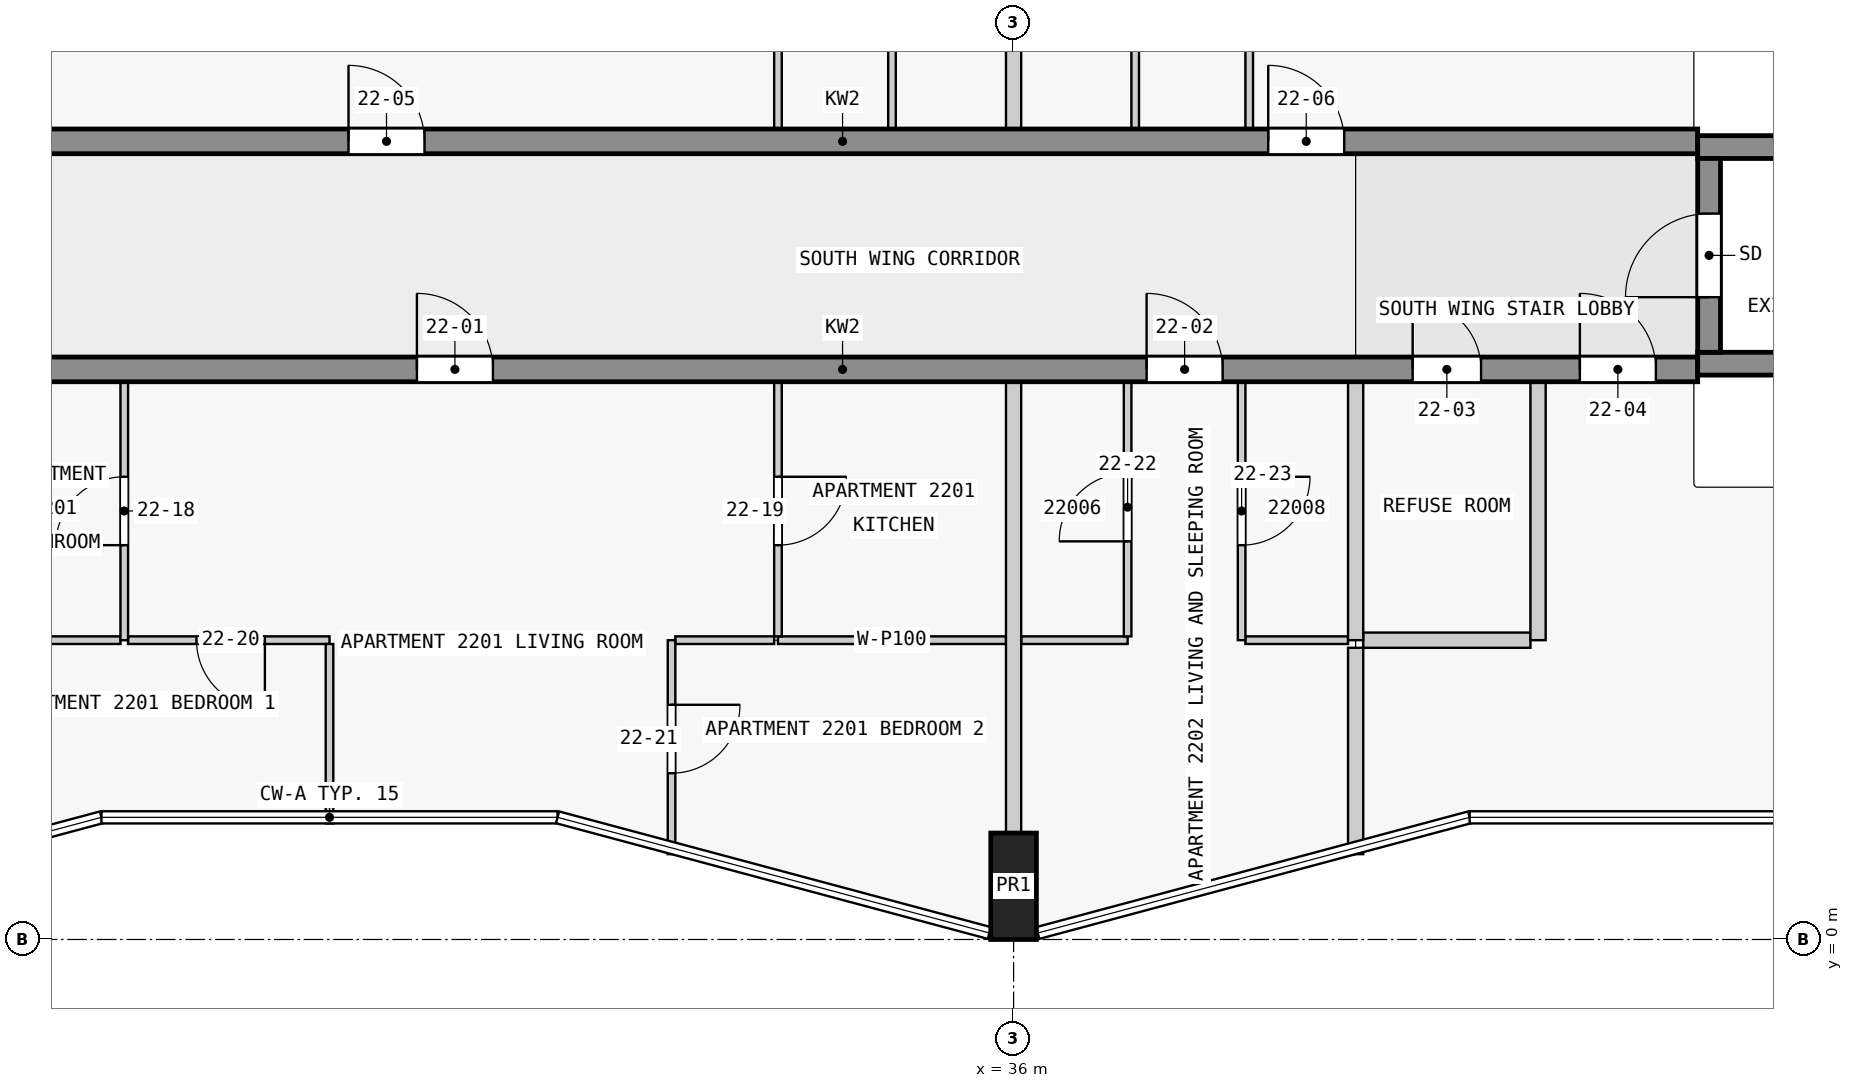
"""IFC4 building model, lengths in metres.
Left out: names, types, materials, properties, quantities, classifications, styles, units other than length and angle.
Written with IfcOpenShell. Run it as: python <this file> out.ifc"""

import sys

from ifc_helpers import new_model, si_unit, direction, frame, frame_2d, origin, origin_2d, place, context, subcontext, project, spatial, rectangle, extrude, element, fill, save


model = new_model("IFC4")
c1 = context("Model", 3, precision=1e-05, world=origin(), true_north=direction((0.0, 1.0)))
c2 = subcontext(c1, "Body", "Model", "MODEL_VIEW")
j1 = project(units=[si_unit("LENGTHUNIT", "METRE"), si_unit("PLANEANGLEUNIT", "RADIAN")], contexts=[c1])
p1 = place(None, origin())
s1 = spatial("IfcSite", under=j1, at=p1, CompositionType="ELEMENT")
p2 = place(p1, origin())
s2 = spatial("IfcBuilding", under=s1, at=p2, CompositionType="ELEMENT")
p3 = place(p2, frame((0.0, 0.0, 88.8)))
s3 = spatial("IfcBuildingStorey", under=s2, at=p3, CompositionType="ELEMENT", Elevation=88.8)
p4 = place(p3, frame((36.0, 0.7, 0.0), z_axis=(0.0, 0.0, 1.0), x_axis=(1.0, 0.0, 0.0)))
e1 = element("IfcColumn", 1, at=p4, inside=s3, PredefinedType="COLUMN", context=c2, shape_type="SweptSolid", body=[
    extrude(rectangle(XDim=0.6, YDim=1.4, at=origin_2d()), origin(), (0.0, 0.0, 1.0), 3.5),
])
p5 = place(p3, frame((45.15, 7.725, 0.0), z_axis=(0.0, 0.0, 1.0), x_axis=(0.0, 1.0, 0.0)))
e2 = element("IfcWall", 2, at=p5, inside=s3, PredefinedType="SHEAR", context=c2, shape_type="SweptSolid", body=[
    extrude(rectangle(XDim=2.55, YDim=0.3, at=frame_2d((1.275, 0.0))), origin(), (0.0, 0.0, 1.0), 3.5),
])
p6 = place(p5, frame((0.725, 0.0, 0.0)))
e3 = element("IfcOpeningElement", 3, at=p6, cuts=e2, PredefinedType="OPENING", context=c2, shape_type="SweptSolid", body=[
    extrude(rectangle(XDim=1.1, YDim=2.1, at=frame_2d((0.55, 1.05))), frame((0.0, 0.16, 0.0), z_axis=(0.0, -1.0, 0.0), x_axis=(1.0, 0.0, 0.0)), (0.0, 0.0, 1.0), 0.32),
])
for number, where, z_axis, x_axis in (
    (4, (45.0, 7.575, 0.0), (0.0, 0.0, 1.0), (1.0, 0.0, 0.0)),
    (5, (45.0, 10.425, 0.0), (0.0, 0.0, 1.0), (1.0, 0.0, 0.0)),
):
    element("IfcWall", number, at=place(p3, frame(where, z_axis=z_axis, x_axis=x_axis)), inside=s3, PredefinedType="SHEAR", context=c2, shape_type="SweptSolid", body=[
        extrude(rectangle(XDim=7.2, YDim=0.3, at=frame_2d((3.6, 0.0))), origin(), (0.0, 0.0, 1.0), 3.5),
    ])
p7 = place(p3, frame((22.5, 7.5, 0.0), z_axis=(0.0, 0.0, 1.0), x_axis=(1.0, 0.0, 0.0)))
e6 = element("IfcWall", 6, at=p7, inside=s3, PredefinedType="SHEAR", context=c2, shape_type="SweptSolid", body=[
    extrude(rectangle(XDim=22.5, YDim=0.325, at=frame_2d((11.25, 0.0))), origin(), (0.0, 0.0, 1.0), 3.25),
])
p8 = place(p7, frame((5.65, 0.0, 0.0)))
e7 = element("IfcOpeningElement", 7, at=p8, cuts=e6, PredefinedType="OPENING", context=c2, shape_type="SweptSolid", body=[
    extrude(rectangle(XDim=1.0, YDim=2.1, at=frame_2d((0.5, 1.05))), frame((0.0, 0.172, 0.0), z_axis=(0.0, -1.0, 0.0), x_axis=(1.0, 0.0, 0.0)), (0.0, 0.0, 1.0), 0.345),
])
p9 = place(p7, frame((15.25, 0.0, 0.0)))
e8 = element("IfcOpeningElement", 8, at=p9, cuts=e6, PredefinedType="OPENING", context=c2, shape_type="SweptSolid", body=[
    extrude(rectangle(XDim=1.0, YDim=2.1, at=frame_2d((0.5, 1.05))), frame((0.0, 0.172, 0.0), z_axis=(0.0, -1.0, 0.0), x_axis=(1.0, 0.0, 0.0)), (0.0, 0.0, 1.0), 0.345),
])
p10 = place(p7, frame((18.75, 0.0, 0.0)))
e9 = element("IfcOpeningElement", 9, at=p10, cuts=e6, PredefinedType="OPENING", context=c2, shape_type="SweptSolid", body=[
    extrude(rectangle(XDim=0.9, YDim=2.1, at=frame_2d((0.45, 1.05))), frame((0.0, 0.172, 0.0), z_axis=(0.0, -1.0, 0.0), x_axis=(1.0, 0.0, 0.0)), (0.0, 0.0, 1.0), 0.345),
])
p11 = place(p7, frame((20.95, 0.0, 0.0)))
e10 = element("IfcOpeningElement", 10, at=p11, cuts=e6, PredefinedType="OPENING", context=c2, shape_type="SweptSolid", body=[
    extrude(rectangle(XDim=1.0, YDim=2.1, at=frame_2d((0.5, 1.05))), frame((0.0, 0.172, 0.0), z_axis=(0.0, -1.0, 0.0), x_axis=(1.0, 0.0, 0.0)), (0.0, 0.0, 1.0), 0.345),
])
p12 = place(p3, frame((22.5, 10.5, 0.0), z_axis=(0.0, 0.0, 1.0), x_axis=(1.0, 0.0, 0.0)))
e11 = element("IfcWall", 11, at=p12, inside=s3, PredefinedType="SHEAR", context=c2, shape_type="SweptSolid", body=[
    extrude(rectangle(XDim=22.5, YDim=0.325, at=frame_2d((11.25, 0.0))), origin(), (0.0, 0.0, 1.0), 3.25),
])
p13 = place(p12, frame((4.75, 0.0, 0.0)))
e12 = element("IfcOpeningElement", 12, at=p13, cuts=e11, PredefinedType="OPENING", context=c2, shape_type="SweptSolid", body=[
    extrude(rectangle(XDim=1.0, YDim=2.1, at=frame_2d((0.5, 1.05))), frame((0.0, 0.172, 0.0), z_axis=(0.0, -1.0, 0.0), x_axis=(1.0, 0.0, 0.0)), (0.0, 0.0, 1.0), 0.345),
])
p14 = place(p12, frame((16.85, 0.0, 0.0)))
e13 = element("IfcOpeningElement", 13, at=p14, cuts=e11, PredefinedType="OPENING", context=c2, shape_type="SweptSolid", body=[
    extrude(rectangle(XDim=1.0, YDim=2.1, at=frame_2d((0.5, 1.05))), frame((0.0, 0.172, 0.0), z_axis=(0.0, -1.0, 0.0), x_axis=(1.0, 0.0, 0.0)), (0.0, 0.0, 1.0), 0.345),
])
p15 = place(p3, frame((27.0, 3.938, 0.0), z_axis=(0.0, 0.0, 1.0), x_axis=(-1.0, 0.0, 0.0)))
e14 = element("IfcWall", 14, at=p15, inside=s3, PredefinedType="PARTITIONING", context=c2, shape_type="SweptSolid", body=[
    extrude(rectangle(XDim=2.65, YDim=0.1, at=frame_2d((1.325, 0.0))), origin(), (0.0, 0.0, 1.0), 3.25),
])
p16 = place(p15, frame((0.85, 0.0, 0.0)))
e15 = element("IfcOpeningElement", 15, at=p16, cuts=e14, PredefinedType="OPENING", context=c2, shape_type="SweptSolid", body=[
    extrude(rectangle(XDim=0.9, YDim=2.1, at=frame_2d((0.45, 1.05))), frame((0.0, 0.06, 0.0), z_axis=(0.0, -1.0, 0.0), x_axis=(1.0, 0.0, 0.0)), (0.0, 0.0, 1.0), 0.12),
])
p17 = place(p3, frame((32.85, 3.938, 0.0), z_axis=(0.0, 0.0, 1.0), x_axis=(-1.0, 0.0, 0.0)))
e16 = element("IfcWall", 16, at=p17, inside=s3, PredefinedType="PARTITIONING", context=c2, shape_type="SweptSolid", body=[
    extrude(rectangle(XDim=1.3, YDim=0.1, at=frame_2d((0.65, 0.0))), origin(), (0.0, 0.0, 1.0), 3.25),
])
p18 = place(p3, frame((22.5, 3.938, 0.0), z_axis=(0.0, 0.0, 1.0), x_axis=(1.0, 0.0, 0.0)))
e17 = element("IfcWall", 17, at=p18, inside=s3, PredefinedType="PARTITIONING", context=c2, shape_type="SweptSolid", body=[
    extrude(rectangle(XDim=1.75, YDim=0.1, at=frame_2d((0.875, 0.0))), origin(), (0.0, 0.0, 1.0), 3.25),
])
p19 = place(p3, frame((32.9, 3.938, 0.0), z_axis=(0.0, 0.0, 1.0), x_axis=(1.0, 0.0, 0.0)))
e18 = element("IfcWall", 18, at=p19, inside=s3, PredefinedType="PARTITIONING", context=c2, shape_type="SweptSolid", body=[
    extrude(rectangle(XDim=3.0, YDim=0.1, at=frame_2d((1.5, 0.0))), origin(), (0.0, 0.0, 1.0), 3.25),
])
p20 = place(p3, frame((36.1, 3.938, 0.0), z_axis=(0.0, 0.0, 1.0), x_axis=(1.0, 0.0, 0.0)))
e19 = element("IfcWall", 19, at=p20, inside=s3, PredefinedType="PARTITIONING", context=c2, shape_type="SweptSolid", body=[
    extrude(rectangle(XDim=1.4, YDim=0.1, at=frame_2d((0.7, 0.0))), origin(), (0.0, 0.0, 1.0), 3.25),
])
p21 = place(p3, frame((39.05, 3.938, 0.0), z_axis=(0.0, 0.0, 1.0), x_axis=(1.0, 0.0, 0.0)))
e20 = element("IfcWall", 20, at=p21, inside=s3, PredefinedType="PARTITIONING", context=c2, shape_type="SweptSolid", body=[
    extrude(rectangle(XDim=1.35, YDim=0.1, at=frame_2d((0.675, 0.0))), origin(), (0.0, 0.0, 1.0), 3.25),
])
p22 = place(p3, frame((40.6, 3.938, 0.0), z_axis=(0.0, 0.0, 1.0), x_axis=(1.0, 0.0, 0.0)))
e21 = element("IfcWall", 21, at=p22, inside=s3, PredefinedType="PARTITIONING", context=c2, shape_type="SweptSolid", body=[
    extrude(rectangle(XDim=2.2, YDim=0.2, at=frame_2d((1.1, 0.0))), origin(), (0.0, 0.0, 1.0), 3.25),
])
p23 = place(p3, frame((24.3, 3.938, 0.0), z_axis=(0.0, 0.0, 1.0), x_axis=(0.0, 1.0, 0.0)))
e22 = element("IfcWall", 22, at=p23, inside=s3, PredefinedType="PARTITIONING", context=c2, shape_type="SweptSolid", body=[
    extrude(rectangle(XDim=3.4, YDim=0.1, at=frame_2d((1.7, 0.0))), origin(), (0.0, 0.0, 1.0), 3.25),
])
p24 = place(p23, frame((1.25, 0.0, 0.0)))
e23 = element("IfcOpeningElement", 23, at=p24, cuts=e22, PredefinedType="OPENING", context=c2, shape_type="SweptSolid", body=[
    extrude(rectangle(XDim=0.9, YDim=2.1, at=frame_2d((0.45, 1.05))), frame((0.0, 0.06, 0.0), z_axis=(0.0, -1.0, 0.0), x_axis=(1.0, 0.0, 0.0)), (0.0, 0.0, 1.0), 0.12),
])
p25 = place(p3, frame((27.0, 1.527, 0.0), z_axis=(0.0, 0.0, 1.0), x_axis=(0.0, 1.0, 0.0)))
e24 = element("IfcWall", 24, at=p25, inside=s3, PredefinedType="PARTITIONING", context=c2, shape_type="SweptSolid", body=[
    extrude(rectangle(XDim=2.361, YDim=0.1, at=frame_2d((1.18, 0.0))), origin(), (0.0, 0.0, 1.0), 3.25),
])
p26 = place(p3, frame((31.5, 3.938, 0.0), z_axis=(0.0, 0.0, 1.0), x_axis=(0.0, -1.0, 0.0)))
e25 = element("IfcWall", 25, at=p26, inside=s3, PredefinedType="PARTITIONING", context=c2, shape_type="SweptSolid", body=[
    extrude(rectangle(XDim=2.815, YDim=0.1, at=frame_2d((1.408, 0.0))), origin(), (0.0, 0.0, 1.0), 3.25),
])
p27 = place(p26, frame((0.85, 0.0, 0.0)))
e26 = element("IfcOpeningElement", 26, at=p27, cuts=e25, PredefinedType="OPENING", context=c2, shape_type="SweptSolid", body=[
    extrude(rectangle(XDim=0.9, YDim=2.1, at=frame_2d((0.45, 1.05))), frame((0.0, 0.06, 0.0), z_axis=(0.0, -1.0, 0.0), x_axis=(1.0, 0.0, 0.0)), (0.0, 0.0, 1.0), 0.12),
])
p28 = place(p3, frame((32.9, 7.337, 0.0), z_axis=(0.0, 0.0, 1.0), x_axis=(0.0, -1.0, 0.0)))
e27 = element("IfcWall", 27, at=p28, inside=s3, PredefinedType="PARTITIONING", context=c2, shape_type="SweptSolid", body=[
    extrude(rectangle(XDim=3.35, YDim=0.1, at=frame_2d((1.675, 0.0))), origin(), (0.0, 0.0, 1.0), 3.25),
])
p29 = place(p28, frame((1.25, 0.0, 0.0)))
e28 = element("IfcOpeningElement", 28, at=p29, cuts=e27, PredefinedType="OPENING", context=c2, shape_type="SweptSolid", body=[
    extrude(rectangle(XDim=0.9, YDim=2.1, at=frame_2d((0.45, 1.05))), frame((0.0, 0.06, 0.0), z_axis=(0.0, -1.0, 0.0), x_axis=(1.0, 0.0, 0.0)), (0.0, 0.0, 1.0), 0.12),
])
p30 = place(p3, frame((32.9, 14.012, 0.0), z_axis=(0.0, 0.0, 1.0), x_axis=(0.0, -1.0, 0.0)))
e29 = element("IfcWall", 29, at=p30, inside=s3, PredefinedType="PARTITIONING", context=c2, shape_type="SweptSolid", body=[
    extrude(rectangle(XDim=3.35, YDim=0.1, at=frame_2d((1.675, 0.0))), origin(), (0.0, 0.0, 1.0), 3.25),
])
p31 = place(p30, frame((1.25, 0.0, 0.0)))
e30 = element("IfcOpeningElement", 30, at=p31, cuts=e29, PredefinedType="OPENING", context=c2, shape_type="SweptSolid", body=[
    extrude(rectangle(XDim=0.9, YDim=2.1, at=frame_2d((0.45, 1.05))), frame((0.0, 0.06, 0.0), z_axis=(0.0, -1.0, 0.0), x_axis=(1.0, 0.0, 0.0)), (0.0, 0.0, 1.0), 0.12),
])
p32 = place(p3, frame((34.4, 10.663, 0.0), z_axis=(0.0, 0.0, 1.0), x_axis=(0.0, 1.0, 0.0)))
e31 = element("IfcWall", 31, at=p32, inside=s3, PredefinedType="PARTITIONING", context=c2, shape_type="SweptSolid", body=[
    extrude(rectangle(XDim=3.35, YDim=0.1, at=frame_2d((1.675, 0.0))), origin(), (0.0, 0.0, 1.0), 3.25),
])
p33 = place(p3, frame((36.0, 1.4, 0.0), z_axis=(0.0, 0.0, 1.0), x_axis=(0.0, 1.0, 0.0)))
e32 = element("IfcWall", 32, at=p33, inside=s3, PredefinedType="PARTITIONING", context=c2, shape_type="SweptSolid", body=[
    extrude(rectangle(XDim=5.938, YDim=0.2, at=frame_2d((2.969, 0.0))), origin(), (0.0, 0.0, 1.0), 3.25),
])
p34 = place(p3, frame((36.0, 10.663, 0.0), z_axis=(0.0, 0.0, 1.0), x_axis=(0.0, 1.0, 0.0)))
e33 = element("IfcWall", 33, at=p34, inside=s3, PredefinedType="PARTITIONING", context=c2, shape_type="SweptSolid", body=[
    extrude(rectangle(XDim=3.4, YDim=0.2, at=frame_2d((1.7, 0.0))), origin(), (0.0, 0.0, 1.0), 3.25),
])
p35 = place(p3, frame((37.5, 3.988, 0.0), z_axis=(0.0, 0.0, 1.0), x_axis=(0.0, 1.0, 0.0)))
e34 = element("IfcWall", 34, at=p35, inside=s3, PredefinedType="PARTITIONING", context=c2, shape_type="SweptSolid", body=[
    extrude(rectangle(XDim=3.35, YDim=0.1, at=frame_2d((1.675, 0.0))), origin(), (0.0, 0.0, 1.0), 3.25),
])
p36 = place(p35, frame((1.25, 0.0, 0.0)))
e35 = element("IfcOpeningElement", 35, at=p36, cuts=e34, PredefinedType="OPENING", context=c2, shape_type="SweptSolid", body=[
    extrude(rectangle(XDim=0.9, YDim=2.1, at=frame_2d((0.45, 1.05))), frame((0.0, 0.06, 0.0), z_axis=(0.0, -1.0, 0.0), x_axis=(1.0, 0.0, 0.0)), (0.0, 0.0, 1.0), 0.12),
])
p37 = place(p3, frame((37.6, 10.663, 0.0), z_axis=(0.0, 0.0, 1.0), x_axis=(0.0, 1.0, 0.0)))
e36 = element("IfcWall", 36, at=p37, inside=s3, PredefinedType="PARTITIONING", context=c2, shape_type="SweptSolid", body=[
    extrude(rectangle(XDim=3.35, YDim=0.1, at=frame_2d((1.675, 0.0))), origin(), (0.0, 0.0, 1.0), 3.25),
])
p38 = place(p3, frame((39.0, 7.337, 0.0), z_axis=(0.0, 0.0, 1.0), x_axis=(0.0, -1.0, 0.0)))
e37 = element("IfcWall", 37, at=p38, inside=s3, PredefinedType="PARTITIONING", context=c2, shape_type="SweptSolid", body=[
    extrude(rectangle(XDim=3.4, YDim=0.1, at=frame_2d((1.7, 0.0))), origin(), (0.0, 0.0, 1.0), 3.25),
])
p39 = place(p38, frame((1.25, 0.0, 0.0)))
e38 = element("IfcOpeningElement", 38, at=p39, cuts=e37, PredefinedType="OPENING", context=c2, shape_type="SweptSolid", body=[
    extrude(rectangle(XDim=0.9, YDim=2.1, at=frame_2d((0.45, 1.05))), frame((0.0, 0.06, 0.0), z_axis=(0.0, -1.0, 0.0), x_axis=(1.0, 0.0, 0.0)), (0.0, 0.0, 1.0), 0.12),
])
p40 = place(p3, frame((39.1, 10.663, 0.0), z_axis=(0.0, 0.0, 1.0), x_axis=(0.0, 1.0, 0.0)))
e39 = element("IfcWall", 39, at=p40, inside=s3, PredefinedType="PARTITIONING", context=c2, shape_type="SweptSolid", body=[
    extrude(rectangle(XDim=3.35, YDim=0.1, at=frame_2d((1.675, 0.0))), origin(), (0.0, 0.0, 1.0), 3.25),
])
p41 = place(p40, frame((1.25, 0.0, 0.0)))
e40 = element("IfcOpeningElement", 40, at=p41, cuts=e39, PredefinedType="OPENING", context=c2, shape_type="SweptSolid", body=[
    extrude(rectangle(XDim=0.9, YDim=2.1, at=frame_2d((0.45, 1.05))), frame((0.0, 0.06, 0.0), z_axis=(0.0, -1.0, 0.0), x_axis=(1.0, 0.0, 0.0)), (0.0, 0.0, 1.0), 0.12),
])
p42 = place(p3, frame((40.5, 3.837, 0.0), z_axis=(0.0, 0.0, 1.0), x_axis=(0.0, -1.0, 0.0)))
e41 = element("IfcWall", 41, at=p42, inside=s3, PredefinedType="PARTITIONING", context=c2, shape_type="SweptSolid", body=[
    extrude(rectangle(XDim=2.715, YDim=0.2, at=frame_2d((1.357, 0.0))), origin(), (0.0, 0.0, 1.0), 3.25),
])
for number, where, z_axis, x_axis in (
    (42, (40.5, 3.938, 0.0), (0.0, 0.0, 1.0), (0.0, 1.0, 0.0)),
    (43, (42.9, 3.938, 0.0), (0.0, 0.0, 1.0), (0.0, 1.0, 0.0)),
):
    element("IfcWall", number, at=place(p3, frame(where, z_axis=z_axis, x_axis=x_axis)), inside=s3, PredefinedType="PARTITIONING", context=c2, shape_type="SweptSolid", body=[
        extrude(rectangle(XDim=3.4, YDim=0.2, at=frame_2d((1.7, 0.0))), origin(), (0.0, 0.0, 1.0), 3.25),
    ])
p43 = place(p6, origin())
e44 = element("IfcDoor", 44, at=p43, inside=s3, OperationType="SINGLE_SWING_LEFT", PredefinedType="DOOR", context=c2, shape_type="SweptSolid", body=[
    extrude(rectangle(XDim=1.1, YDim=2.1, at=frame_2d((0.55, 1.05))), frame((0.0, 0.025, 0.0), z_axis=(0.0, -1.0, 0.0), x_axis=(1.0, 0.0, 0.0)), (0.0, 0.0, 1.0), 0.05),
])
fill(e3, e44)
p44 = place(p8, origin())
e45 = element("IfcDoor", 45, at=p44, inside=s3, OperationType="SINGLE_SWING_LEFT", PredefinedType="DOOR", context=c2, shape_type="SweptSolid", body=[
    extrude(rectangle(XDim=1.0, YDim=2.1, at=frame_2d((0.5, 1.05))), frame((0.0, 0.025, 0.0), z_axis=(0.0, -1.0, 0.0), x_axis=(1.0, 0.0, 0.0)), (0.0, 0.0, 1.0), 0.05),
])
fill(e7, e45)
p45 = place(p9, origin())
e46 = element("IfcDoor", 46, at=p45, inside=s3, OperationType="SINGLE_SWING_RIGHT", PredefinedType="DOOR", context=c2, shape_type="SweptSolid", body=[
    extrude(rectangle(XDim=1.0, YDim=2.1, at=frame_2d((0.5, 1.05))), frame((0.0, 0.025, 0.0), z_axis=(0.0, -1.0, 0.0), x_axis=(1.0, 0.0, 0.0)), (0.0, 0.0, 1.0), 0.05),
])
fill(e8, e46)
p46 = place(p10, origin())
e47 = element("IfcDoor", 47, at=p46, inside=s3, OperationType="SINGLE_SWING_RIGHT", PredefinedType="DOOR", context=c2, shape_type="SweptSolid", body=[
    extrude(rectangle(XDim=0.9, YDim=2.1, at=frame_2d((0.45, 1.05))), frame((0.0, 0.025, 0.0), z_axis=(0.0, -1.0, 0.0), x_axis=(1.0, 0.0, 0.0)), (0.0, 0.0, 1.0), 0.05),
])
fill(e9, e47)
p47 = place(p11, origin())
e48 = element("IfcDoor", 48, at=p47, inside=s3, OperationType="SINGLE_SWING_RIGHT", PredefinedType="DOOR", context=c2, shape_type="SweptSolid", body=[
    extrude(rectangle(XDim=1.0, YDim=2.1, at=frame_2d((0.5, 1.05))), frame((0.0, 0.025, 0.0), z_axis=(0.0, -1.0, 0.0), x_axis=(1.0, 0.0, 0.0)), (0.0, 0.0, 1.0), 0.05),
])
fill(e10, e48)
p48 = place(p13, origin())
e49 = element("IfcDoor", 49, at=p48, inside=s3, OperationType="SINGLE_SWING_LEFT", PredefinedType="DOOR", context=c2, shape_type="SweptSolid", body=[
    extrude(rectangle(XDim=1.0, YDim=2.1, at=frame_2d((0.5, 1.05))), frame((0.0, 0.025, 0.0), z_axis=(0.0, -1.0, 0.0), x_axis=(1.0, 0.0, 0.0)), (0.0, 0.0, 1.0), 0.05),
])
fill(e12, e49)
p49 = place(p14, origin())
e50 = element("IfcDoor", 50, at=p49, inside=s3, OperationType="SINGLE_SWING_RIGHT", PredefinedType="DOOR", context=c2, shape_type="SweptSolid", body=[
    extrude(rectangle(XDim=1.0, YDim=2.1, at=frame_2d((0.5, 1.05))), frame((0.0, 0.025, 0.0), z_axis=(0.0, -1.0, 0.0), x_axis=(1.0, 0.0, 0.0)), (0.0, 0.0, 1.0), 0.05),
])
fill(e13, e50)
p50 = place(p24, origin())
e51 = element("IfcDoor", 51, at=p50, inside=s3, OperationType="SINGLE_SWING_LEFT", PredefinedType="DOOR", context=c2, shape_type="SweptSolid", body=[
    extrude(rectangle(XDim=0.9, YDim=2.1, at=frame_2d((0.45, 1.05))), frame((0.0, 0.025, 0.0), z_axis=(0.0, -1.0, 0.0), x_axis=(1.0, 0.0, 0.0)), (0.0, 0.0, 1.0), 0.05),
])
fill(e23, e51)
p51 = place(p29, origin())
e52 = element("IfcDoor", 52, at=p51, inside=s3, OperationType="SINGLE_SWING_RIGHT", PredefinedType="DOOR", context=c2, shape_type="SweptSolid", body=[
    extrude(rectangle(XDim=0.9, YDim=2.1, at=frame_2d((0.45, 1.05))), frame((0.0, 0.025, 0.0), z_axis=(0.0, -1.0, 0.0), x_axis=(1.0, 0.0, 0.0)), (0.0, 0.0, 1.0), 0.05),
])
fill(e28, e52)
p52 = place(p16, origin())
e53 = element("IfcDoor", 53, at=p52, inside=s3, OperationType="SINGLE_SWING_LEFT", PredefinedType="DOOR", context=c2, shape_type="SweptSolid", body=[
    extrude(rectangle(XDim=0.9, YDim=2.1, at=frame_2d((0.45, 1.05))), frame((0.0, 0.025, 0.0), z_axis=(0.0, -1.0, 0.0), x_axis=(1.0, 0.0, 0.0)), (0.0, 0.0, 1.0), 0.05),
])
fill(e15, e53)
p53 = place(p27, origin())
e54 = element("IfcDoor", 54, at=p53, inside=s3, OperationType="SINGLE_SWING_LEFT", PredefinedType="DOOR", context=c2, shape_type="SweptSolid", body=[
    extrude(rectangle(XDim=0.9, YDim=2.1, at=frame_2d((0.45, 1.05))), frame((0.0, 0.025, 0.0), z_axis=(0.0, -1.0, 0.0), x_axis=(1.0, 0.0, 0.0)), (0.0, 0.0, 1.0), 0.05),
])
fill(e26, e54)
p54 = place(p36, origin())
e55 = element("IfcDoor", 55, at=p54, inside=s3, OperationType="SINGLE_SWING_RIGHT", PredefinedType="DOOR", context=c2, shape_type="SweptSolid", body=[
    extrude(rectangle(XDim=0.9, YDim=2.1, at=frame_2d((0.45, 1.05))), frame((0.0, 0.025, 0.0), z_axis=(0.0, -1.0, 0.0), x_axis=(1.0, 0.0, 0.0)), (0.0, 0.0, 1.0), 0.05),
])
fill(e35, e55)
p55 = place(p39, origin())
e56 = element("IfcDoor", 56, at=p55, inside=s3, OperationType="SINGLE_SWING_LEFT", PredefinedType="DOOR", context=c2, shape_type="SweptSolid", body=[
    extrude(rectangle(XDim=0.9, YDim=2.1, at=frame_2d((0.45, 1.05))), frame((0.0, 0.025, 0.0), z_axis=(0.0, -1.0, 0.0), x_axis=(1.0, 0.0, 0.0)), (0.0, 0.0, 1.0), 0.05),
])
fill(e38, e56)
save(model, sys.argv[1])
